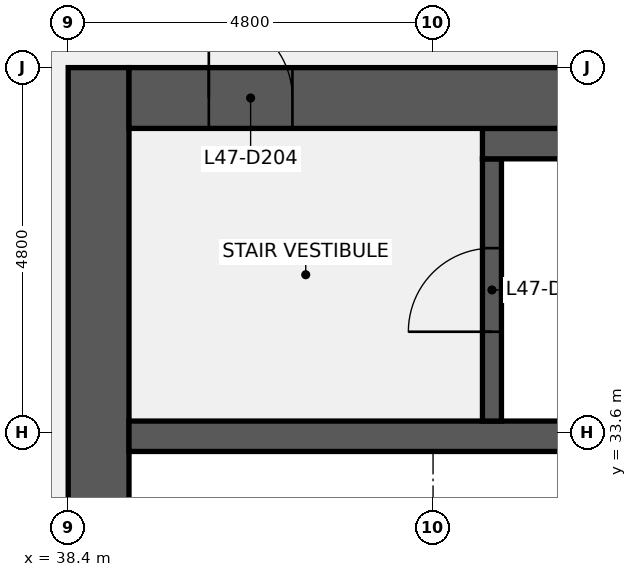
"""IFC4 building model, lengths in metres.
Left out: names, types, materials, properties, quantities, classifications, styles, units other than length and angle.
Written with IfcOpenShell. Run it as: python <this file> out.ifc"""

import sys

from ifc_helpers import new_model, si_unit, direction, frame, frame_2d, origin, place, context, subcontext, project, spatial, rectangle, extrude, element, fill, save


model = new_model("IFC4")
c1 = context("Model", 3, precision=1e-05, world=origin(), true_north=direction((0.0, 1.0)))
c2 = subcontext(c1, "Body", "Model", "MODEL_VIEW")
j1 = project(units=[si_unit("LENGTHUNIT", "METRE"), si_unit("PLANEANGLEUNIT", "RADIAN")], contexts=[c1])
p1 = place(None, origin())
s1 = spatial("IfcSite", under=j1, at=p1, CompositionType="ELEMENT")
p2 = place(p1, origin())
s2 = spatial("IfcBuilding", under=s1, at=p2, CompositionType="ELEMENT")
p3 = place(p2, frame((0.0, 0.0, 217.2)))
s3 = spatial("IfcBuildingStorey", under=s2, at=p3, CompositionType="ELEMENT", Elevation=217.2)
p4 = place(p3, frame((38.8, 9.6, 0.0), z_axis=(0.0, 0.0, 1.0), x_axis=(0.0, 1.0, 0.0)))
e1 = element("IfcWall", 1, at=p4, inside=s3, PredefinedType="SHEAR", context=c2, shape_type="SweptSolid", body=[
    extrude(rectangle(XDim=28.8, YDim=0.8, at=frame_2d((14.4, 0.0))), origin(), (0.0, 0.0, 1.0), 3.84),
])
p5 = place(p4, frame((8.7, 0.0, 0.0)))
e2 = element("IfcOpeningElement", 2, at=p5, cuts=e1, PredefinedType="OPENING", context=c2, shape_type="SweptSolid", body=[
    extrude(rectangle(XDim=1.8, YDim=2.1, at=frame_2d((0.9, 1.05))), frame((0.0, 0.41, 0.0), z_axis=(0.0, -1.0, 0.0), x_axis=(1.0, 0.0, 0.0)), (0.0, 0.0, 1.0), 0.82),
])
p6 = place(p4, frame((18.3, 0.0, 0.0)))
e3 = element("IfcOpeningElement", 3, at=p6, cuts=e1, PredefinedType="OPENING", context=c2, shape_type="SweptSolid", body=[
    extrude(rectangle(XDim=1.8, YDim=2.1, at=frame_2d((0.9, 1.05))), frame((0.0, 0.41, 0.0), z_axis=(0.0, -1.0, 0.0), x_axis=(1.0, 0.0, 0.0)), (0.0, 0.0, 1.0), 0.82),
])
p7 = place(p3, frame((39.2, 33.55, 0.0), z_axis=(0.0, 0.0, 1.0), x_axis=(1.0, 0.0, 0.0)))
e4 = element("IfcWall", 4, at=p7, inside=s3, PredefinedType="SHEAR", context=c2, shape_type="SweptSolid", body=[
    extrude(rectangle(XDim=17.6, YDim=0.4, at=frame_2d((8.8, 0.0))), origin(), (0.0, 0.0, 1.0), 3.84),
])
p8 = place(p3, frame((43.975, 33.75, 0.0), z_axis=(0.0, 0.0, 1.0), x_axis=(0.0, 1.0, 0.0)))
e5 = element("IfcWall", 5, at=p8, inside=s3, PredefinedType="SHEAR", context=c2, shape_type="SweptSolid", body=[
    extrude(rectangle(XDim=3.45, YDim=0.25, at=frame_2d((1.725, 0.0))), origin(), (0.0, 0.0, 1.0), 3.84),
])
p9 = place(p8, frame((1.175, 0.0, 0.0)))
e6 = element("IfcOpeningElement", 6, at=p9, cuts=e5, PredefinedType="OPENING", context=c2, shape_type="SweptSolid", body=[
    extrude(rectangle(XDim=1.1, YDim=2.1, at=frame_2d((0.55, 1.05))), frame((0.0, 0.135, 0.0), z_axis=(0.0, -1.0, 0.0), x_axis=(1.0, 0.0, 0.0)), (0.0, 0.0, 1.0), 0.27),
])
p10 = place(p3, frame((43.85, 37.4, 0.0), z_axis=(0.0, 0.0, 1.0), x_axis=(1.0, 0.0, 0.0)))
e7 = element("IfcWall", 7, at=p10, inside=s3, PredefinedType="SHEAR", context=c2, shape_type="SweptSolid", body=[
    extrude(rectangle(XDim=4.15, YDim=0.4, at=frame_2d((2.075, 0.0))), origin(), (0.0, 0.0, 1.0), 3.84),
])
p11 = place(p3, frame((39.2, 38.0, 0.0), z_axis=(0.0, 0.0, 1.0), x_axis=(1.0, 0.0, 0.0)))
e8 = element("IfcWall", 8, at=p11, inside=s3, PredefinedType="SHEAR", context=c2, shape_type="SweptSolid", body=[
    extrude(rectangle(XDim=8.8, YDim=0.8, at=frame_2d((4.4, 0.0))), origin(), (0.0, 0.0, 1.0), 3.84),
])
p12 = place(p11, frame((1.05, 0.0, 0.0)))
e9 = element("IfcOpeningElement", 9, at=p12, cuts=e8, PredefinedType="OPENING", context=c2, shape_type="SweptSolid", body=[
    extrude(rectangle(XDim=1.1, YDim=2.1, at=frame_2d((0.55, 1.05))), frame((0.0, 0.41, 0.0), z_axis=(0.0, -1.0, 0.0), x_axis=(1.0, 0.0, 0.0)), (0.0, 0.0, 1.0), 0.82),
])
p13 = place(p9, origin())
e10 = element("IfcDoor", 10, at=p13, inside=s3, OperationType="SINGLE_SWING_LEFT", PredefinedType="DOOR", context=c2, shape_type="SweptSolid", body=[
    extrude(rectangle(XDim=1.1, YDim=2.1, at=frame_2d((0.55, 1.05))), frame((0.0, 0.025, 0.0), z_axis=(0.0, -1.0, 0.0), x_axis=(1.0, 0.0, 0.0)), (0.0, 0.0, 1.0), 0.05),
])
fill(e6, e10)
p14 = place(p12, origin())
e11 = element("IfcDoor", 11, at=p14, inside=s3, OperationType="SINGLE_SWING_LEFT", PredefinedType="DOOR", context=c2, shape_type="SweptSolid", body=[
    extrude(rectangle(XDim=1.1, YDim=2.1, at=frame_2d((0.55, 1.05))), frame((0.0, 0.025, 0.0), z_axis=(0.0, -1.0, 0.0), x_axis=(1.0, 0.0, 0.0)), (0.0, 0.0, 1.0), 0.05),
])
fill(e9, e11)
save(model, sys.argv[1])
